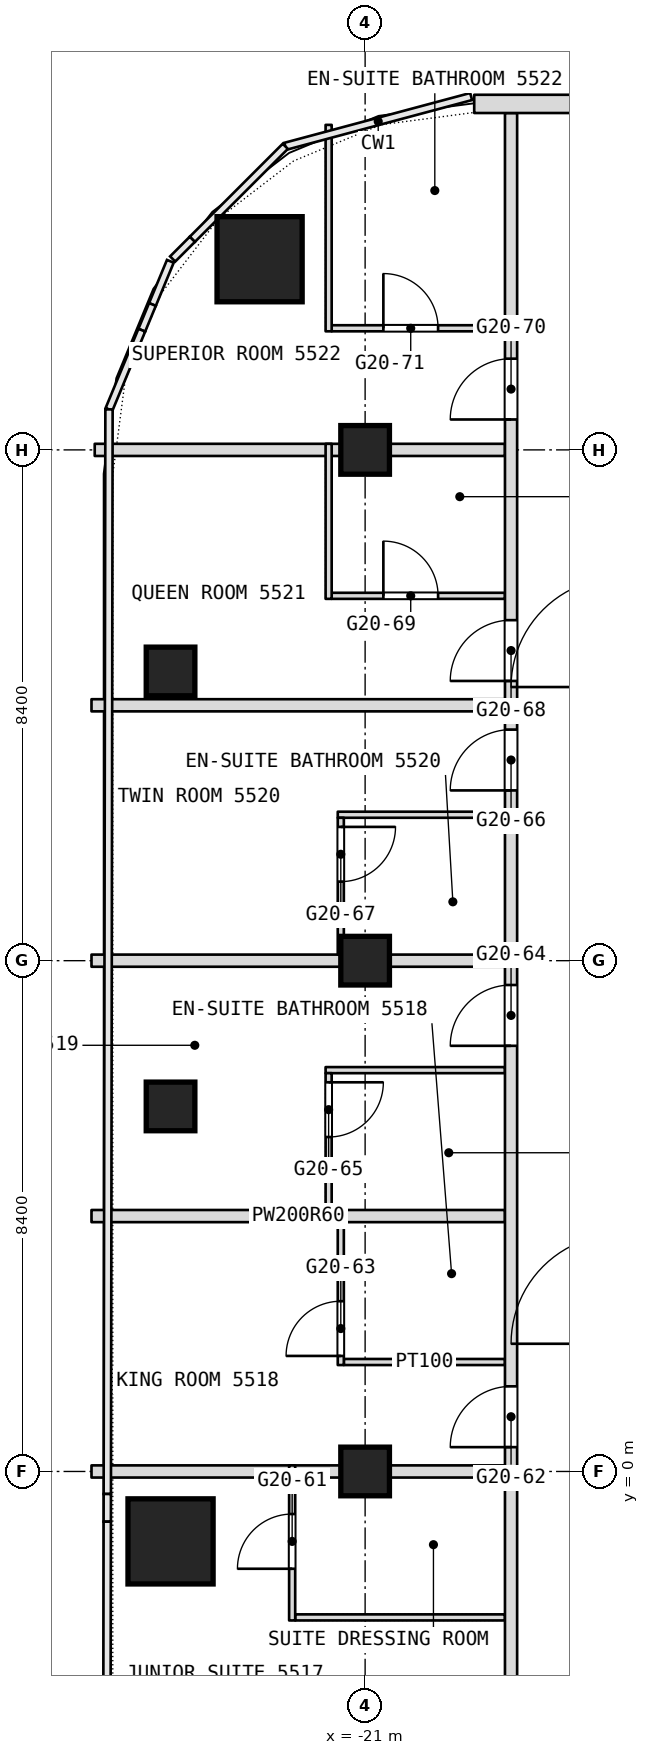
"""IFC4 building model, lengths in metres.
Left out: names, types, materials, properties, quantities, classifications, styles, units other than length and angle.
Written with IfcOpenShell. Run it as: python <this file> out.ifc"""

import sys

from ifc_helpers import new_model, si_unit, direction, frame, frame_2d, origin, origin_2d, place, context, subcontext, project, spatial, rectangle, extrude, element, fill, save


model = new_model("IFC4")
c1 = context("Model", 3, precision=1e-05, world=origin(), true_north=direction((0.0, 1.0)))
c2 = subcontext(c1, "Body", "Model", "MODEL_VIEW")
j1 = project(units=[si_unit("LENGTHUNIT", "METRE"), si_unit("PLANEANGLEUNIT", "RADIAN")], contexts=[c1])
p1 = place(None, origin())
s1 = spatial("IfcSite", under=j1, at=p1, CompositionType="ELEMENT")
p2 = place(p1, origin())
s2 = spatial("IfcBuilding", under=s1, at=p2, CompositionType="ELEMENT")
p3 = place(p2, frame((0.0, 0.0, 234.5)))
s3 = spatial("IfcBuildingStorey", under=s2, at=p3, CompositionType="ELEMENT", Elevation=234.5)
for number, where, z_axis, x_axis in (
    (1, (-22.736, 19.936, 0.0), (0.0, 0.0, 1.0), (1.0, 0.0, 0.0)),
    (2, (-24.2, -1.15, 0.0), (0.0, 0.0, 1.0), (1.0, 0.0, 0.0)),
):
    element("IfcColumn", number, at=place(p3, frame(where, z_axis=z_axis, x_axis=x_axis)), inside=s3, PredefinedType="COLUMN", context=c2, shape_type="SweptSolid", body=[
        extrude(rectangle(XDim=1.4, YDim=1.4, at=origin_2d()), origin(), (0.0, 0.0, 1.0), 3.6),
    ])
for number, where, z_axis, x_axis in (
    (3, (-21.0, 0.0, 0.0), (0.0, 0.0, 1.0), (1.0, 0.0, 0.0)),
    (4, (-21.0, 8.4, 0.0), (0.0, 0.0, 1.0), (1.0, 0.0, 0.0)),
    (5, (-21.0, 16.8, 0.0), (0.0, 0.0, 1.0), (1.0, 0.0, 0.0)),
    (6, (-24.2, 6.003, 0.0), (0.0, 0.0, 1.0), (1.0, 0.0, 0.0)),
    (7, (-24.2, 13.156, 0.0), (0.0, 0.0, 1.0), (1.0, 0.0, 0.0)),
):
    element("IfcColumn", number, at=place(p3, frame(where, z_axis=z_axis, x_axis=x_axis)), inside=s3, PredefinedType="COLUMN", context=c2, shape_type="SweptSolid", body=[
        extrude(rectangle(XDim=0.8, YDim=0.8, at=origin_2d()), origin(), (0.0, 0.0, 1.0), 3.6),
    ])
p4 = place(p3, frame((-22.15, -2.4, 0.0), z_axis=(0.0, 0.0, 1.0), x_axis=(1.0, 0.0, 0.0)))
e8 = element("IfcWall", 8, at=p4, inside=s3, PredefinedType="PARTITIONING", context=c2, shape_type="SweptSolid", body=[
    extrude(rectangle(XDim=3.45, YDim=0.1, at=frame_2d((1.725, 0.0))), origin(), (0.0, 0.0, 1.0), 3.34),
])
p5 = place(p3, frame((-25.5, 0.0, 0.0), z_axis=(0.0, 0.0, 1.0), x_axis=(1.0, 0.0, 0.0)))
e9 = element("IfcWall", 9, at=p5, inside=s3, PredefinedType="PARTITIONING", context=c2, shape_type="SweptSolid", body=[
    extrude(rectangle(XDim=6.8, YDim=0.2, at=frame_2d((3.4, 0.0))), origin(), (0.0, 0.0, 1.0), 2.94),
])
p6 = place(p3, frame((-21.35, 1.8, 0.0), z_axis=(0.0, 0.0, 1.0), x_axis=(1.0, 0.0, 0.0)))
e10 = element("IfcWall", 10, at=p6, inside=s3, PredefinedType="PARTITIONING", context=c2, shape_type="SweptSolid", body=[
    extrude(rectangle(XDim=2.65, YDim=0.1, at=frame_2d((1.325, 0.0))), origin(), (0.0, 0.0, 1.0), 3.34),
])
p7 = place(p3, frame((-25.5, 4.2, 0.0), z_axis=(0.0, 0.0, 1.0), x_axis=(1.0, 0.0, 0.0)))
e11 = element("IfcWall", 11, at=p7, inside=s3, PredefinedType="PARTITIONING", context=c2, shape_type="SweptSolid", body=[
    extrude(rectangle(XDim=6.8, YDim=0.2, at=frame_2d((3.4, 0.0))), origin(), (0.0, 0.0, 1.0), 3.34),
])
p8 = place(p3, frame((-21.65, 6.6, 0.0), z_axis=(0.0, 0.0, 1.0), x_axis=(1.0, 0.0, 0.0)))
e12 = element("IfcWall", 12, at=p8, inside=s3, PredefinedType="PARTITIONING", context=c2, shape_type="SweptSolid", body=[
    extrude(rectangle(XDim=2.95, YDim=0.1, at=frame_2d((1.475, 0.0))), origin(), (0.0, 0.0, 1.0), 3.34),
])
p9 = place(p3, frame((-25.5, 8.4, 0.0), z_axis=(0.0, 0.0, 1.0), x_axis=(1.0, 0.0, 0.0)))
e13 = element("IfcWall", 13, at=p9, inside=s3, PredefinedType="PARTITIONING", context=c2, shape_type="SweptSolid", body=[
    extrude(rectangle(XDim=6.8, YDim=0.2, at=frame_2d((3.4, 0.0))), origin(), (0.0, 0.0, 1.0), 2.94),
])
p10 = place(p3, frame((-21.45, 10.8, 0.0), z_axis=(0.0, 0.0, 1.0), x_axis=(1.0, 0.0, 0.0)))
e14 = element("IfcWall", 14, at=p10, inside=s3, PredefinedType="PARTITIONING", context=c2, shape_type="SweptSolid", body=[
    extrude(rectangle(XDim=2.75, YDim=0.1, at=frame_2d((1.375, 0.0))), origin(), (0.0, 0.0, 1.0), 3.34),
])
p11 = place(p3, frame((-25.5, 12.6, 0.0), z_axis=(0.0, 0.0, 1.0), x_axis=(1.0, 0.0, 0.0)))
e15 = element("IfcWall", 15, at=p11, inside=s3, PredefinedType="PARTITIONING", context=c2, shape_type="SweptSolid", body=[
    extrude(rectangle(XDim=6.8, YDim=0.2, at=frame_2d((3.4, 0.0))), origin(), (0.0, 0.0, 1.0), 3.34),
])
p12 = place(p3, frame((-21.55, 14.4, 0.0), z_axis=(0.0, 0.0, 1.0), x_axis=(1.0, 0.0, 0.0)))
e16 = element("IfcWall", 16, at=p12, inside=s3, PredefinedType="PARTITIONING", context=c2, shape_type="SweptSolid", body=[
    extrude(rectangle(XDim=2.85, YDim=0.1, at=frame_2d((1.425, 0.0))), origin(), (0.0, 0.0, 1.0), 3.34),
])
p13 = place(p12, frame((0.85, 0.0, 0.0)))
e17 = element("IfcOpeningElement", 17, at=p13, cuts=e16, PredefinedType="OPENING", context=c2, shape_type="SweptSolid", body=[
    extrude(rectangle(XDim=0.9, YDim=2.1, at=frame_2d((0.45, 1.05))), frame((0.0, 0.05, 0.0), z_axis=(0.0, -1.0, 0.0), x_axis=(1.0, 0.0, 0.0)), (0.0, 0.0, 1.0), 0.1),
])
p14 = place(p3, frame((-25.447, 16.8, 0.0), z_axis=(0.0, 0.0, 1.0), x_axis=(1.0, 0.0, 0.0)))
e18 = element("IfcWall", 18, at=p14, inside=s3, PredefinedType="PARTITIONING", context=c2, shape_type="SweptSolid", body=[
    extrude(rectangle(XDim=6.747, YDim=0.2, at=frame_2d((3.374, 0.0))), origin(), (0.0, 0.0, 1.0), 2.94),
])
p15 = place(p3, frame((-18.6, -26.751, 0.0), z_axis=(0.0, 0.0, 1.0), x_axis=(0.0, 1.0, 0.0)))
e19 = element("IfcWall", 19, at=p15, inside=s3, PredefinedType="PARTITIONING", context=c2, shape_type="SweptSolid", body=[
    extrude(rectangle(XDim=49.091, YDim=0.2, at=frame_2d((24.545, 0.0))), origin(), (0.0, 0.0, 1.0), 3.34),
])
p16 = place(p15, frame((3.413, 0.0, 0.0)))
e20 = element("IfcOpeningElement", 20, at=p16, cuts=e19, PredefinedType="OPENING", context=c2, shape_type="SweptSolid", body=[
    extrude(rectangle(XDim=1.0, YDim=2.1, at=frame_2d((0.5, 1.05))), frame((0.0, 0.1, 0.0), z_axis=(0.0, -1.0, 0.0), x_axis=(1.0, 0.0, 0.0)), (0.0, 0.0, 1.0), 0.2),
])
p17 = place(p15, frame((5.838, 0.0, 0.0)))
e21 = element("IfcOpeningElement", 21, at=p17, cuts=e19, PredefinedType="OPENING", context=c2, shape_type="SweptSolid", body=[
    extrude(rectangle(XDim=1.0, YDim=2.1, at=frame_2d((0.5, 1.05))), frame((0.0, 0.1, 0.0), z_axis=(0.0, -1.0, 0.0), x_axis=(1.0, 0.0, 0.0)), (0.0, 0.0, 1.0), 0.2),
])
p18 = place(p15, frame((13.551, 0.0, 0.0)))
e22 = element("IfcOpeningElement", 22, at=p18, cuts=e19, PredefinedType="OPENING", context=c2, shape_type="SweptSolid", body=[
    extrude(rectangle(XDim=1.1, YDim=2.1, at=frame_2d((0.55, 1.05))), frame((0.0, 0.1, 0.0), z_axis=(0.0, -1.0, 0.0), x_axis=(1.0, 0.0, 0.0)), (0.0, 0.0, 1.0), 0.2),
])
p19 = place(p15, frame((22.051, 0.0, 0.0)))
e23 = element("IfcOpeningElement", 23, at=p19, cuts=e19, PredefinedType="OPENING", context=c2, shape_type="SweptSolid", body=[
    extrude(rectangle(XDim=1.1, YDim=2.1, at=frame_2d((0.55, 1.05))), frame((0.0, 0.1, 0.0), z_axis=(0.0, -1.0, 0.0), x_axis=(1.0, 0.0, 0.0)), (0.0, 0.0, 1.0), 0.2),
])
p20 = place(p15, frame((27.151, 0.0, 0.0)))
e24 = element("IfcOpeningElement", 24, at=p20, cuts=e19, PredefinedType="OPENING", context=c2, shape_type="SweptSolid", body=[
    extrude(rectangle(XDim=1.0, YDim=2.1, at=frame_2d((0.5, 1.05))), frame((0.0, 0.1, 0.0), z_axis=(0.0, -1.0, 0.0), x_axis=(1.0, 0.0, 0.0)), (0.0, 0.0, 1.0), 0.2),
])
p21 = place(p15, frame((33.751, 0.0, 0.0)))
e25 = element("IfcOpeningElement", 25, at=p21, cuts=e19, PredefinedType="OPENING", context=c2, shape_type="SweptSolid", body=[
    extrude(rectangle(XDim=1.0, YDim=2.1, at=frame_2d((0.5, 1.05))), frame((0.0, 0.1, 0.0), z_axis=(0.0, -1.0, 0.0), x_axis=(1.0, 0.0, 0.0)), (0.0, 0.0, 1.0), 0.2),
])
p22 = place(p15, frame((37.951, 0.0, 0.0)))
e26 = element("IfcOpeningElement", 26, at=p22, cuts=e19, PredefinedType="OPENING", context=c2, shape_type="SweptSolid", body=[
    extrude(rectangle(XDim=1.0, YDim=2.1, at=frame_2d((0.5, 1.05))), frame((0.0, 0.1, 0.0), z_axis=(0.0, -1.0, 0.0), x_axis=(1.0, 0.0, 0.0)), (0.0, 0.0, 1.0), 0.2),
])
p23 = place(p15, frame((39.751, 0.0, 0.0)))
e27 = element("IfcOpeningElement", 27, at=p23, cuts=e19, PredefinedType="OPENING", context=c2, shape_type="SweptSolid", body=[
    extrude(rectangle(XDim=1.0, YDim=2.1, at=frame_2d((0.5, 1.05))), frame((0.0, 0.1, 0.0), z_axis=(0.0, -1.0, 0.0), x_axis=(1.0, 0.0, 0.0)), (0.0, 0.0, 1.0), 0.2),
])
p24 = place(p15, frame((44.051, 0.0, 0.0)))
e28 = element("IfcOpeningElement", 28, at=p24, cuts=e19, PredefinedType="OPENING", context=c2, shape_type="SweptSolid", body=[
    extrude(rectangle(XDim=1.0, YDim=2.1, at=frame_2d((0.5, 1.05))), frame((0.0, 0.1, 0.0), z_axis=(0.0, -1.0, 0.0), x_axis=(1.0, 0.0, 0.0)), (0.0, 0.0, 1.0), 0.2),
])
p25 = place(p3, frame((-21.55, 18.8, 0.0), z_axis=(0.0, 0.0, 1.0), x_axis=(1.0, 0.0, 0.0)))
e29 = element("IfcWall", 29, at=p25, inside=s3, PredefinedType="PARTITIONING", context=c2, shape_type="SweptSolid", body=[
    extrude(rectangle(XDim=2.85, YDim=0.1, at=frame_2d((1.425, 0.0))), origin(), (0.0, 0.0, 1.0), 3.34),
])
p26 = place(p25, frame((0.85, 0.0, 0.0)))
e30 = element("IfcOpeningElement", 30, at=p26, cuts=e29, PredefinedType="OPENING", context=c2, shape_type="SweptSolid", body=[
    extrude(rectangle(XDim=0.9, YDim=2.1, at=frame_2d((0.45, 1.05))), frame((0.0, 0.05, 0.0), z_axis=(0.0, -1.0, 0.0), x_axis=(1.0, 0.0, 0.0)), (0.0, 0.0, 1.0), 0.1),
])
p27 = place(p3, frame((-21.4, 1.75, 0.0), z_axis=(0.0, 0.0, 1.0), x_axis=(0.0, 1.0, 0.0)))
e31 = element("IfcWall", 31, at=p27, inside=s3, PredefinedType="PARTITIONING", context=c2, shape_type="SweptSolid", body=[
    extrude(rectangle(XDim=2.55, YDim=0.1, at=frame_2d((1.275, 0.0))), origin(), (0.0, 0.0, 1.0), 3.34),
])
p28 = place(p27, frame((0.15, 0.0, 0.0)))
e32 = element("IfcOpeningElement", 32, at=p28, cuts=e31, PredefinedType="OPENING", context=c2, shape_type="SweptSolid", body=[
    extrude(rectangle(XDim=0.9, YDim=2.1, at=frame_2d((0.45, 1.05))), frame((0.0, 0.05, 0.0), z_axis=(0.0, -1.0, 0.0), x_axis=(1.0, 0.0, 0.0)), (0.0, 0.0, 1.0), 0.1),
])
p29 = place(p3, frame((-21.4, 8.5, 0.0), z_axis=(0.0, 0.0, 1.0), x_axis=(0.0, 1.0, 0.0)))
e33 = element("IfcWall", 33, at=p29, inside=s3, PredefinedType="PARTITIONING", context=c2, shape_type="SweptSolid", body=[
    extrude(rectangle(XDim=2.25, YDim=0.1, at=frame_2d((1.125, 0.0))), origin(), (0.0, 0.0, 1.0), 3.34),
])
p30 = place(p29, frame((1.2, 0.0, 0.0)))
e34 = element("IfcOpeningElement", 34, at=p30, cuts=e33, PredefinedType="OPENING", context=c2, shape_type="SweptSolid", body=[
    extrude(rectangle(XDim=0.9, YDim=2.1, at=frame_2d((0.45, 1.05))), frame((0.0, 0.05, 0.0), z_axis=(0.0, -1.0, 0.0), x_axis=(1.0, 0.0, 0.0)), (0.0, 0.0, 1.0), 0.1),
])
p31 = place(p3, frame((-21.6, 4.3, 0.0), z_axis=(0.0, 0.0, 1.0), x_axis=(0.0, 1.0, 0.0)))
e35 = element("IfcWall", 35, at=p31, inside=s3, PredefinedType="PARTITIONING", context=c2, shape_type="SweptSolid", body=[
    extrude(rectangle(XDim=2.25, YDim=0.1, at=frame_2d((1.125, 0.0))), origin(), (0.0, 0.0, 1.0), 3.34),
])
p32 = place(p31, frame((1.2, 0.0, 0.0)))
e36 = element("IfcOpeningElement", 36, at=p32, cuts=e35, PredefinedType="OPENING", context=c2, shape_type="SweptSolid", body=[
    extrude(rectangle(XDim=0.9, YDim=2.1, at=frame_2d((0.45, 1.05))), frame((0.0, 0.05, 0.0), z_axis=(0.0, -1.0, 0.0), x_axis=(1.0, 0.0, 0.0)), (0.0, 0.0, 1.0), 0.1),
])
p33 = place(p3, frame((-21.6, 14.35, 0.0), z_axis=(0.0, 0.0, 1.0), x_axis=(0.0, 1.0, 0.0)))
e37 = element("IfcWall", 37, at=p33, inside=s3, PredefinedType="PARTITIONING", context=c2, shape_type="SweptSolid", body=[
    extrude(rectangle(XDim=2.55, YDim=0.1, at=frame_2d((1.275, 0.0))), origin(), (0.0, 0.0, 1.0), 3.34),
])
p34 = place(p3, frame((-21.6, 18.75, 0.0), z_axis=(0.0, 0.0, 1.0), x_axis=(0.0, 1.0, 0.0)))
e38 = element("IfcWall", 38, at=p34, inside=s3, PredefinedType="PARTITIONING", context=c2, shape_type="SweptSolid", body=[
    extrude(rectangle(XDim=3.395, YDim=0.1, at=frame_2d((1.698, 0.0))), origin(), (0.0, 0.0, 1.0), 3.34),
])
p35 = place(p3, frame((-22.2, -2.45, 0.0), z_axis=(0.0, 0.0, 1.0), x_axis=(0.0, 1.0, 0.0)))
e39 = element("IfcWall", 39, at=p35, inside=s3, PredefinedType="PARTITIONING", context=c2, shape_type="SweptSolid", body=[
    extrude(rectangle(XDim=2.55, YDim=0.1, at=frame_2d((1.275, 0.0))), origin(), (0.0, 0.0, 1.0), 3.34),
])
p36 = place(p35, frame((0.85, 0.0, 0.0)))
e40 = element("IfcOpeningElement", 40, at=p36, cuts=e39, PredefinedType="OPENING", context=c2, shape_type="SweptSolid", body=[
    extrude(rectangle(XDim=0.9, YDim=2.1, at=frame_2d((0.45, 1.05))), frame((0.0, 0.05, 0.0), z_axis=(0.0, -1.0, 0.0), x_axis=(1.0, 0.0, 0.0)), (0.0, 0.0, 1.0), 0.1),
])
p37 = place(p3, frame((19.206, 22.49, 0.0), z_axis=(0.0, 0.0, 1.0), x_axis=(-1.0, 0.0, 0.0)))
e41 = element("IfcWall", 41, at=p37, inside=s3, PredefinedType="NOTDEFINED", context=c2, shape_type="SweptSolid", body=[
    extrude(rectangle(XDim=38.412, YDim=0.3, at=frame_2d((19.206, 0.0))), origin(), (0.0, 0.0, 1.0), 3.6),
])
p38 = place(p37, frame((3.306, 0.0, 0.9)))
e42 = element("IfcOpeningElement", 42, at=p38, cuts=e41, PredefinedType="OPENING", context=c2, shape_type="SweptSolid", body=[
    extrude(rectangle(XDim=2.4, YDim=2.1, at=frame_2d((1.2, 1.05))), frame((0.0, 0.15, 0.0), z_axis=(0.0, -1.0, 0.0), x_axis=(1.0, 0.0, 0.0)), (0.0, 0.0, 1.0), 0.3),
])
p39 = place(p37, frame((7.506, 0.0, 0.9)))
e43 = element("IfcOpeningElement", 43, at=p39, cuts=e41, PredefinedType="OPENING", context=c2, shape_type="SweptSolid", body=[
    extrude(rectangle(XDim=2.4, YDim=2.1, at=frame_2d((1.2, 1.05))), frame((0.0, 0.15, 0.0), z_axis=(0.0, -1.0, 0.0), x_axis=(1.0, 0.0, 0.0)), (0.0, 0.0, 1.0), 0.3),
])
p40 = place(p37, frame((11.706, 0.0, 0.9)))
e44 = element("IfcOpeningElement", 44, at=p40, cuts=e41, PredefinedType="OPENING", context=c2, shape_type="SweptSolid", body=[
    extrude(rectangle(XDim=2.4, YDim=2.1, at=frame_2d((1.2, 1.05))), frame((0.0, 0.15, 0.0), z_axis=(0.0, -1.0, 0.0), x_axis=(1.0, 0.0, 0.0)), (0.0, 0.0, 1.0), 0.3),
])
p41 = place(p37, frame((15.906, 0.0, 0.9)))
e45 = element("IfcOpeningElement", 45, at=p41, cuts=e41, PredefinedType="OPENING", context=c2, shape_type="SweptSolid", body=[
    extrude(rectangle(XDim=2.4, YDim=2.1, at=frame_2d((1.2, 1.05))), frame((0.0, 0.15, 0.0), z_axis=(0.0, -1.0, 0.0), x_axis=(1.0, 0.0, 0.0)), (0.0, 0.0, 1.0), 0.3),
])
p42 = place(p37, frame((20.106, 0.0, 0.9)))
e46 = element("IfcOpeningElement", 46, at=p42, cuts=e41, PredefinedType="OPENING", context=c2, shape_type="SweptSolid", body=[
    extrude(rectangle(XDim=2.4, YDim=2.1, at=frame_2d((1.2, 1.05))), frame((0.0, 0.15, 0.0), z_axis=(0.0, -1.0, 0.0), x_axis=(1.0, 0.0, 0.0)), (0.0, 0.0, 1.0), 0.3),
])
p43 = place(p37, frame((24.306, 0.0, 0.9)))
e47 = element("IfcOpeningElement", 47, at=p43, cuts=e41, PredefinedType="OPENING", context=c2, shape_type="SweptSolid", body=[
    extrude(rectangle(XDim=2.4, YDim=2.1, at=frame_2d((1.2, 1.05))), frame((0.0, 0.15, 0.0), z_axis=(0.0, -1.0, 0.0), x_axis=(1.0, 0.0, 0.0)), (0.0, 0.0, 1.0), 0.3),
])
p44 = place(p37, frame((28.506, 0.0, 0.9)))
e48 = element("IfcOpeningElement", 48, at=p44, cuts=e41, PredefinedType="OPENING", context=c2, shape_type="SweptSolid", body=[
    extrude(rectangle(XDim=2.4, YDim=2.1, at=frame_2d((1.2, 1.05))), frame((0.0, 0.15, 0.0), z_axis=(0.0, -1.0, 0.0), x_axis=(1.0, 0.0, 0.0)), (0.0, 0.0, 1.0), 0.3),
])
p45 = place(p37, frame((32.706, 0.0, 0.9)))
e49 = element("IfcOpeningElement", 49, at=p45, cuts=e41, PredefinedType="OPENING", context=c2, shape_type="SweptSolid", body=[
    extrude(rectangle(XDim=2.4, YDim=2.1, at=frame_2d((1.2, 1.05))), frame((0.0, 0.15, 0.0), z_axis=(0.0, -1.0, 0.0), x_axis=(1.0, 0.0, 0.0)), (0.0, 0.0, 1.0), 0.3),
])
p46 = place(p13, origin())
e50 = element("IfcDoor", 50, at=p46, inside=s3, OperationType="SINGLE_SWING_LEFT", PredefinedType="DOOR", context=c2, shape_type="SweptSolid", body=[
    extrude(rectangle(XDim=0.9, YDim=2.1, at=frame_2d((0.45, 1.05))), frame((0.0, 0.025, 0.0), z_axis=(0.0, -1.0, 0.0), x_axis=(1.0, 0.0, 0.0)), (0.0, 0.0, 1.0), 0.05),
])
fill(e17, e50)
p47 = place(p20, origin())
e51 = element("IfcDoor", 51, at=p47, inside=s3, OperationType="SINGLE_SWING_LEFT", PredefinedType="DOOR", context=c2, shape_type="SweptSolid", body=[
    extrude(rectangle(XDim=1.0, YDim=2.1, at=frame_2d((0.5, 1.05))), frame((0.0, 0.025, 0.0), z_axis=(0.0, -1.0, 0.0), x_axis=(1.0, 0.0, 0.0)), (0.0, 0.0, 1.0), 0.05),
])
fill(e24, e51)
p48 = place(p21, origin())
e52 = element("IfcDoor", 52, at=p48, inside=s3, OperationType="SINGLE_SWING_LEFT", PredefinedType="DOOR", context=c2, shape_type="SweptSolid", body=[
    extrude(rectangle(XDim=1.0, YDim=2.1, at=frame_2d((0.5, 1.05))), frame((0.0, 0.025, 0.0), z_axis=(0.0, -1.0, 0.0), x_axis=(1.0, 0.0, 0.0)), (0.0, 0.0, 1.0), 0.05),
])
fill(e25, e52)
p49 = place(p22, origin())
e53 = element("IfcDoor", 53, at=p49, inside=s3, OperationType="SINGLE_SWING_LEFT", PredefinedType="DOOR", context=c2, shape_type="SweptSolid", body=[
    extrude(rectangle(XDim=1.0, YDim=2.1, at=frame_2d((0.5, 1.05))), frame((0.0, 0.025, 0.0), z_axis=(0.0, -1.0, 0.0), x_axis=(1.0, 0.0, 0.0)), (0.0, 0.0, 1.0), 0.05),
])
fill(e26, e53)
p50 = place(p23, origin())
e54 = element("IfcDoor", 54, at=p50, inside=s3, OperationType="SINGLE_SWING_LEFT", PredefinedType="DOOR", context=c2, shape_type="SweptSolid", body=[
    extrude(rectangle(XDim=1.0, YDim=2.1, at=frame_2d((0.5, 1.05))), frame((0.0, 0.025, 0.0), z_axis=(0.0, -1.0, 0.0), x_axis=(1.0, 0.0, 0.0)), (0.0, 0.0, 1.0), 0.05),
])
fill(e27, e54)
p51 = place(p24, origin())
e55 = element("IfcDoor", 55, at=p51, inside=s3, OperationType="SINGLE_SWING_LEFT", PredefinedType="DOOR", context=c2, shape_type="SweptSolid", body=[
    extrude(rectangle(XDim=1.0, YDim=2.1, at=frame_2d((0.5, 1.05))), frame((0.0, 0.025, 0.0), z_axis=(0.0, -1.0, 0.0), x_axis=(1.0, 0.0, 0.0)), (0.0, 0.0, 1.0), 0.05),
])
fill(e28, e55)
p52 = place(p26, origin())
e56 = element("IfcDoor", 56, at=p52, inside=s3, OperationType="SINGLE_SWING_LEFT", PredefinedType="DOOR", context=c2, shape_type="SweptSolid", body=[
    extrude(rectangle(XDim=0.9, YDim=2.1, at=frame_2d((0.45, 1.05))), frame((0.0, 0.025, 0.0), z_axis=(0.0, -1.0, 0.0), x_axis=(1.0, 0.0, 0.0)), (0.0, 0.0, 1.0), 0.05),
])
fill(e30, e56)
p53 = place(p28, origin())
e57 = element("IfcDoor", 57, at=p53, inside=s3, OperationType="SINGLE_SWING_RIGHT", PredefinedType="DOOR", context=c2, shape_type="SweptSolid", body=[
    extrude(rectangle(XDim=0.9, YDim=2.1, at=frame_2d((0.45, 1.05))), frame((0.0, 0.025, 0.0), z_axis=(0.0, -1.0, 0.0), x_axis=(1.0, 0.0, 0.0)), (0.0, 0.0, 1.0), 0.05),
])
fill(e32, e57)
p54 = place(p30, origin())
e58 = element("IfcDoor", 58, at=p54, inside=s3, OperationType="SINGLE_SWING_LEFT", PredefinedType="DOOR", context=c2, shape_type="SweptSolid", body=[
    extrude(rectangle(XDim=0.9, YDim=2.1, at=frame_2d((0.45, 1.05))), frame((0.0, 0.025, 0.0), z_axis=(0.0, -1.0, 0.0), x_axis=(1.0, 0.0, 0.0)), (0.0, 0.0, 1.0), 0.05),
])
fill(e34, e58)
p55 = place(p32, origin())
e59 = element("IfcDoor", 59, at=p55, inside=s3, OperationType="SINGLE_SWING_LEFT", PredefinedType="DOOR", context=c2, shape_type="SweptSolid", body=[
    extrude(rectangle(XDim=0.9, YDim=2.1, at=frame_2d((0.45, 1.05))), frame((0.0, 0.025, 0.0), z_axis=(0.0, -1.0, 0.0), x_axis=(1.0, 0.0, 0.0)), (0.0, 0.0, 1.0), 0.05),
])
fill(e36, e59)
p56 = place(p36, origin())
e60 = element("IfcDoor", 60, at=p56, inside=s3, OperationType="SINGLE_SWING_LEFT", PredefinedType="DOOR", context=c2, shape_type="SweptSolid", body=[
    extrude(rectangle(XDim=0.9, YDim=2.1, at=frame_2d((0.45, 1.05))), frame((0.0, 0.025, 0.0), z_axis=(0.0, -1.0, 0.0), x_axis=(1.0, 0.0, 0.0)), (0.0, 0.0, 1.0), 0.05),
])
fill(e40, e60)
save(model, sys.argv[1])
